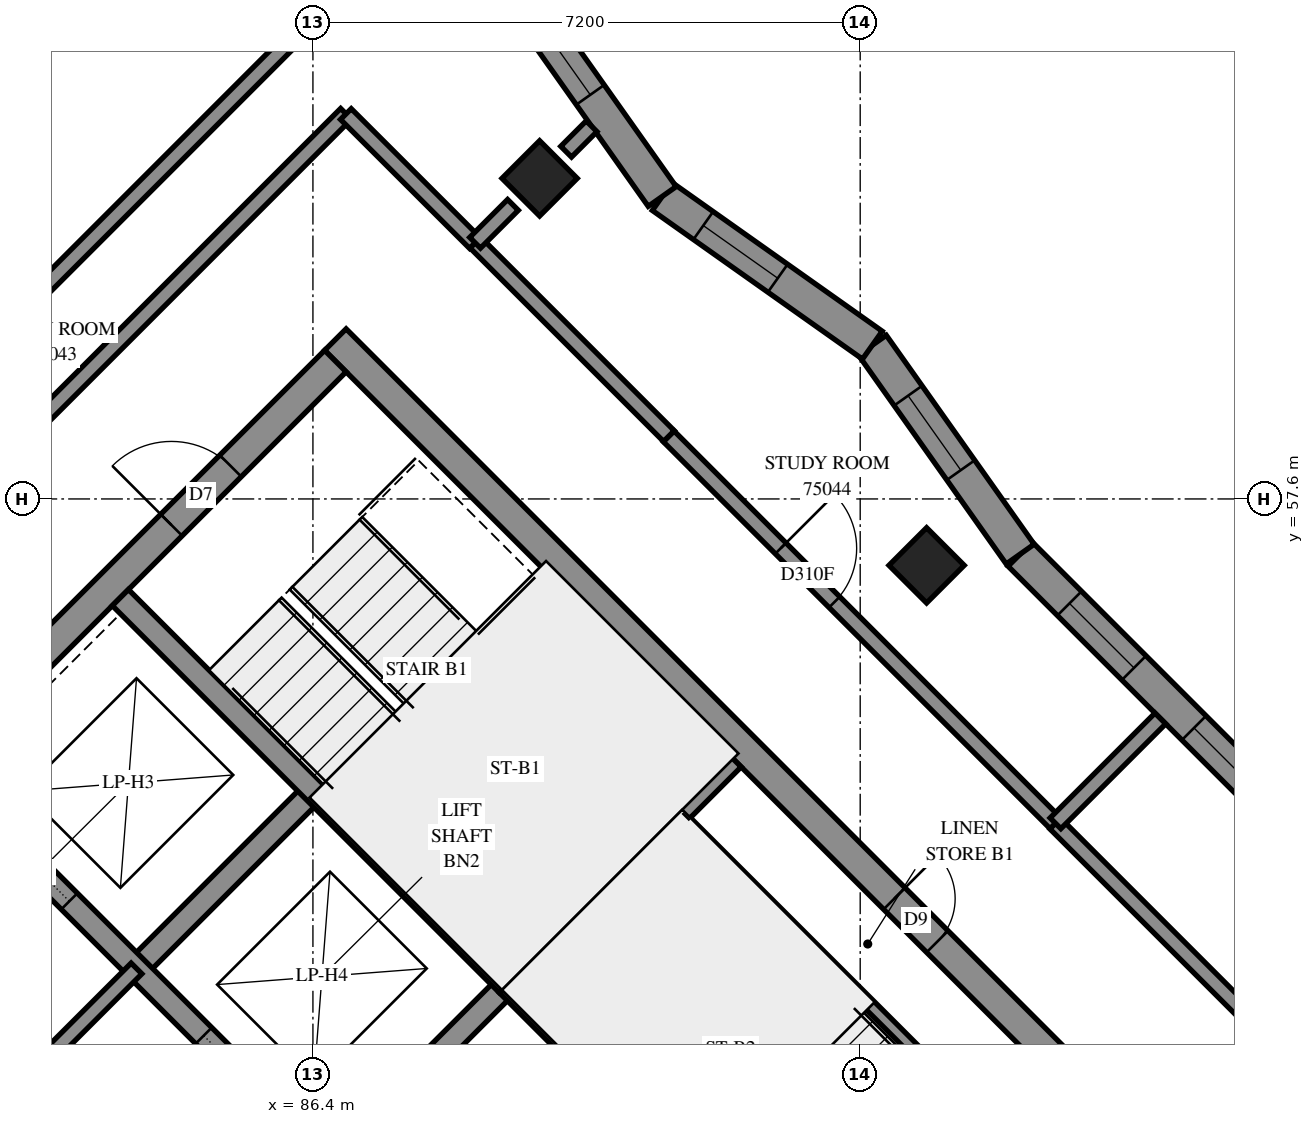
"""IFC4 building model, lengths in metres.
Left out: names, types, materials, properties, quantities, classifications, styles, units other than length and angle.
Written with IfcOpenShell. Run it as: python <this file> out.ifc"""

import sys

from ifc_helpers import new_model, si_unit, direction, frame, frame_2d, origin, origin_2d, place, context, subcontext, project, spatial, polyline, rectangle, outline, extrude, element, fill, save


model = new_model("IFC4")
c1 = context("Model", 3, precision=1e-05, world=origin(), true_north=direction((0.0, 1.0)))
c2 = subcontext(c1, "Body", "Model", "MODEL_VIEW")
j1 = project(units=[si_unit("LENGTHUNIT", "METRE"), si_unit("PLANEANGLEUNIT", "RADIAN")], contexts=[c1])
p1 = place(None, origin())
s1 = spatial("IfcSite", under=j1, at=p1, CompositionType="ELEMENT")
p2 = place(p1, origin())
s2 = spatial("IfcBuilding", under=s1, at=p2, CompositionType="ELEMENT")
p3 = place(p2, frame((0.0, 0.0, 274.4)))
s3 = spatial("IfcBuildingStorey", under=s2, at=p3, CompositionType="ELEMENT", Elevation=274.4)
for number, where, z_axis, x_axis in (
    (1, (89.382, 61.818, 0.0), (0.0, 0.0, 1.0), (0.707, -0.707, 0.0)),
    (2, (94.474, 56.727, 0.0), (0.0, 0.0, 1.0), (0.707, -0.707, 0.0)),
):
    element("IfcColumn", number, at=place(p3, frame(where, z_axis=z_axis, x_axis=x_axis)), inside=s3, PredefinedType="COLUMN", context=c2, shape_type="SweptSolid", body=[
        extrude(rectangle(XDim=0.7, YDim=0.7, at=origin_2d()), origin(), (0.0, 0.0, 1.0), 3.1),
    ])
p4 = place(p3, frame((86.695, 59.696, -0.3), z_axis=(0.0, 0.0, 1.0), x_axis=(0.7071100706, -0.7071034917, 0.0)))
e3 = element("IfcWall", 3, at=p4, inside=s3, PredefinedType="SHEAR", context=c2, shape_type="SweptSolid", body=[
    extrude(rectangle(XDim=15.2, YDim=0.4, at=frame_2d((7.6, 0.0))), origin(), (0.0, 0.0, 1.0), 2.7),
])
p5 = place(p4, frame((10.4, 0.0, 0.3)))
e4 = element("IfcOpeningElement", 4, at=p5, cuts=e3, PredefinedType="OPENING", context=c2, shape_type="SweptSolid", body=[
    extrude(rectangle(XDim=0.8, YDim=2.1, at=frame_2d((0.4, 1.05))), frame((0.0, 0.21, 0.0), z_axis=(0.0, -1.0, 0.0), x_axis=(1.0, 0.0, 0.0)), (0.0, 0.0, 1.0), 0.42),
])
p6 = place(p3, frame((76.513, 49.231, -0.3), z_axis=(0.0, 0.0, 1.0), x_axis=(0.7071067812, 0.7071067812, 0.0)))
e5 = element("IfcWall", 5, at=p6, inside=s3, PredefinedType="SHEAR", context=c2, shape_type="SweptSolid", body=[
    extrude(rectangle(XDim=14.4, YDim=0.4, at=frame_2d((7.2, 0.0))), origin(), (0.0, 0.0, 1.0), 2.7),
])
p7 = place(p6, frame((4.55, 0.0, 0.3)))
e6 = element("IfcOpeningElement", 6, at=p7, cuts=e5, PredefinedType="OPENING", context=c2, shape_type="SweptSolid", body=[
    extrude(rectangle(XDim=1.1, YDim=2.1, at=frame_2d((0.55, 1.05))), frame((0.0, 0.21, 0.0), z_axis=(0.0, -1.0, 0.0), x_axis=(1.0, 0.0, 0.0)), (0.0, 0.0, 1.0), 0.42),
])
p8 = place(p6, frame((11.35, 0.0, 0.3)))
e7 = element("IfcOpeningElement", 7, at=p8, cuts=e5, PredefinedType="OPENING", context=c2, shape_type="SweptSolid", body=[
    extrude(rectangle(XDim=1.1, YDim=2.1, at=frame_2d((0.55, 1.05))), frame((0.0, 0.21, 0.0), z_axis=(0.0, -1.0, 0.0), x_axis=(1.0, 0.0, 0.0)), (0.0, 0.0, 1.0), 0.42),
])
p9 = place(p3, frame((84.079, 51.423, 0.0), z_axis=(0.0, 0.0, 1.0), x_axis=(0.7071219326, 0.7070916295, 0.0)))
e8 = element("IfcWall", 8, at=p9, inside=s3, PredefinedType="SOLIDWALL", context=c2, shape_type="SweptSolid", body=[
    extrude(rectangle(XDim=3.3, YDim=0.3, at=frame_2d((1.65, 0.0))), origin(), (0.0, 0.0, 1.0), 3.1),
])
p10 = place(p3, frame((86.625, 48.878, 0.0), z_axis=(0.0, 0.0, 1.0), x_axis=(0.7071067812, 0.7071067812, 0.0)))
e9 = element("IfcWall", 9, at=p10, inside=s3, PredefinedType="SOLIDWALL", context=c2, shape_type="SweptSolid", body=[
    extrude(rectangle(XDim=3.3, YDim=0.3, at=frame_2d((1.65, 0.0))), origin(), (0.0, 0.0, 1.0), 3.1),
])
p11 = place(p3, frame((78.988, 51.423, 0.0), z_axis=(0.0, 0.0, 1.0), x_axis=(0.7071067812, -0.7071067812, 0.0)))
e10 = element("IfcWall", 10, at=p11, inside=s3, PredefinedType="SOLIDWALL", context=c2, shape_type="SweptSolid", body=[
    extrude(rectangle(XDim=14.4, YDim=0.3, at=frame_2d((7.2, 0.0))), origin(), (0.0, 0.0, 1.0), 3.1),
])
p12 = place(p11, frame((1.35, 0.0, 0.0)))
e11 = element("IfcOpeningElement", 11, at=p12, cuts=e10, PredefinedType="OPENING", context=c2, shape_type="SweptSolid", body=[
    extrude(rectangle(XDim=0.9, YDim=2.1, at=frame_2d((0.45, 1.05))), frame((0.0, 0.16, 0.0), z_axis=(0.0, -1.0, 0.0), x_axis=(1.0, 0.0, 0.0)), (0.0, 0.0, 1.0), 0.32),
])
p13 = place(p11, frame((4.95, 0.0, 0.0)))
e12 = element("IfcOpeningElement", 12, at=p13, cuts=e10, PredefinedType="OPENING", context=c2, shape_type="SweptSolid", body=[
    extrude(rectangle(XDim=0.9, YDim=2.1, at=frame_2d((0.45, 1.05))), frame((0.0, 0.16, 0.0), z_axis=(0.0, -1.0, 0.0), x_axis=(1.0, 0.0, 0.0)), (0.0, 0.0, 1.0), 0.32),
])
p14 = place(p11, frame((8.55, 0.0, 0.0)))
e13 = element("IfcOpeningElement", 13, at=p14, cuts=e10, PredefinedType="OPENING", context=c2, shape_type="SweptSolid", body=[
    extrude(rectangle(XDim=0.9, YDim=2.1, at=frame_2d((0.45, 1.05))), frame((0.0, 0.16, 0.0), z_axis=(0.0, -1.0, 0.0), x_axis=(1.0, 0.0, 0.0)), (0.0, 0.0, 1.0), 0.32),
])
p15 = place(p11, frame((12.05, 0.0, 0.0)))
e14 = element("IfcOpeningElement", 14, at=p15, cuts=e10, PredefinedType="OPENING", context=c2, shape_type="SweptSolid", body=[
    extrude(rectangle(XDim=1.1, YDim=2.1, at=frame_2d((0.55, 1.05))), frame((0.0, 0.16, 0.0), z_axis=(0.0, -1.0, 0.0), x_axis=(1.0, 0.0, 0.0)), (0.0, 0.0, 1.0), 0.32),
])
p16 = place(p3, frame((81.534, 53.969, 0.0), z_axis=(0.0, 0.0, 1.0), x_axis=(0.707103309, -0.7071102534, 0.0)))
e15 = element("IfcWall", 15, at=p16, inside=s3, PredefinedType="SOLIDWALL", context=c2, shape_type="SweptSolid", body=[
    extrude(rectangle(XDim=14.4, YDim=0.3, at=frame_2d((7.2, 0.0))), origin(), (0.0, 0.0, 1.0), 3.1),
])
p17 = place(p16, frame((8.55, 0.0, 0.0)))
e16 = element("IfcOpeningElement", 16, at=p17, cuts=e15, PredefinedType="OPENING", context=c2, shape_type="SweptSolid", body=[
    extrude(rectangle(XDim=0.9, YDim=2.1, at=frame_2d((0.45, 1.05))), frame((0.0, 0.16, 0.0), z_axis=(0.0, -1.0, 0.0), x_axis=(1.0, 0.0, 0.0)), (0.0, 0.0, 1.0), 0.32),
])
p18 = place(p16, frame((1.25, 0.0, 0.0)))
e17 = element("IfcOpeningElement", 17, at=p18, cuts=e15, PredefinedType="OPENING", context=c2, shape_type="SweptSolid", body=[
    extrude(rectangle(XDim=1.1, YDim=2.1, at=frame_2d((0.55, 1.05))), frame((0.0, 0.16, 0.0), z_axis=(0.0, -1.0, 0.0), x_axis=(1.0, 0.0, 0.0)), (0.0, 0.0, 1.0), 0.32),
])
p19 = place(p16, frame((4.85, 0.0, 0.0)))
e18 = element("IfcOpeningElement", 18, at=p19, cuts=e15, PredefinedType="OPENING", context=c2, shape_type="SweptSolid", body=[
    extrude(rectangle(XDim=1.1, YDim=2.1, at=frame_2d((0.55, 1.05))), frame((0.0, 0.16, 0.0), z_axis=(0.0, -1.0, 0.0), x_axis=(1.0, 0.0, 0.0)), (0.0, 0.0, 1.0), 0.32),
])
p20 = place(p16, frame((12.05, 0.0, 0.0)))
e19 = element("IfcOpeningElement", 19, at=p20, cuts=e15, PredefinedType="OPENING", context=c2, shape_type="SweptSolid", body=[
    extrude(rectangle(XDim=1.1, YDim=2.1, at=frame_2d((0.55, 1.05))), frame((0.0, 0.16, 0.0), z_axis=(0.0, -1.0, 0.0), x_axis=(1.0, 0.0, 0.0)), (0.0, 0.0, 1.0), 0.32),
])
for number, where, z_axis, x_axis in (
    (20, (83.867, 56.302, 0.0), (0.0, 0.0, 1.0), (0.707, -0.707, 0.0)),
    (21, (88.958, 51.211, 0.0), (0.0, 0.0, 1.0), (0.707, -0.707, 0.0)),
):
    element("IfcWall", number, at=place(p3, frame(where, z_axis=z_axis, x_axis=x_axis)), inside=s3, PredefinedType="SOLIDWALL", context=c2, shape_type="SweptSolid", body=[
        extrude(rectangle(XDim=7.2, YDim=0.3, at=frame_2d((3.6, 0.0))), origin(), (0.0, 0.0, 1.0), 3.1),
    ])
p21 = place(p3, frame((88.958, 51.211, 0.0), z_axis=(0.0, 0.0, 1.0), x_axis=(0.7071067812, 0.7071067812, 0.0)))
e22 = element("IfcWall", 22, at=p21, inside=s3, PredefinedType="SOLIDWALL", context=c2, shape_type="SweptSolid", body=[
    extrude(rectangle(XDim=4.2, YDim=0.3, at=frame_2d((2.1, 0.0))), origin(), (0.0, 0.0, 1.0), 3.1),
])
p22 = place(p3, frame((100.466, 52.113, 0.0), z_axis=(0.0, 0.0, 1.0), x_axis=(-0.7071067812, 0.7071067812, 0.0)))
e23 = element("IfcWall", 23, at=p22, inside=s3, PredefinedType="SOLIDWALL", context=c2, shape_type="SweptSolid", body=[
    extrude(outline(polyline([(0.038, -0.225), (6.715, -0.225), (6.753, 0.225), (-0.038, 0.225), (0.038, -0.225)])), origin(), (0.0, 0.0, 1.0), 3.1),
])
p23 = place(p22, frame((0.7, 0.0, 0.45)))
e24 = element("IfcOpeningElement", 24, at=p23, cuts=e23, PredefinedType="OPENING", context=c2, shape_type="SweptSolid", body=[
    extrude(rectangle(XDim=2.8, YDim=2.55, at=frame_2d((1.4, 1.275))), frame((0.0, 0.235, 0.0), z_axis=(0.0, -1.0, 0.0), x_axis=(1.0, 0.0, 0.0)), (0.0, 0.0, 1.0), 0.47),
])
p24 = place(p22, frame((4.617, 0.0, 0.45)))
e25 = element("IfcOpeningElement", 25, at=p24, cuts=e23, PredefinedType="OPENING", context=c2, shape_type="SweptSolid", body=[
    extrude(rectangle(XDim=1.2, YDim=2.55, at=frame_2d((0.6, 1.275))), frame((0.0, 0.235, 0.0), z_axis=(0.0, -1.0, 0.0), x_axis=(1.0, 0.0, 0.0)), (0.0, 0.0, 1.0), 0.47),
])
p25 = place(p3, frame((95.705, 56.874, 0.0), z_axis=(0.0, 0.0, 1.0), x_axis=(-0.5775269957, 0.8163715877, 0.0)))
e26 = element("IfcWall", 26, at=p25, inside=s3, PredefinedType="SOLIDWALL", context=c2, shape_type="SweptSolid", body=[
    extrude(outline(polyline([(0.019, -0.225), (3.406, -0.225), (3.329, 0.225), (-0.019, 0.225), (0.019, -0.225)])), origin(), (0.0, 0.0, 1.0), 3.1),
])
p26 = place(p25, frame((1.353, 0.0, 0.45)))
e27 = element("IfcOpeningElement", 27, at=p26, cuts=e26, PredefinedType="OPENING", context=c2, shape_type="SweptSolid", body=[
    extrude(rectangle(XDim=1.2, YDim=2.55, at=frame_2d((0.6, 1.275))), frame((0.0, 0.235, 0.0), z_axis=(0.0, -1.0, 0.0), x_axis=(1.0, 0.0, 0.0)), (0.0, 0.0, 1.0), 0.47),
])
p27 = place(p3, frame((93.76, 59.623, 0.0), z_axis=(0.0, 0.0, 1.0), x_axis=(-0.8163643715, 0.5775371961, 0.0)))
e28 = element("IfcWall", 28, at=p27, inside=s3, PredefinedType="SOLIDWALL", context=c2, shape_type="SweptSolid", body=[
    extrude(outline(polyline([(-0.039, -0.225), (3.348, -0.225), (3.425, 0.225), (0.039, 0.225), (-0.039, -0.225)])), origin(), (0.0, 0.0, 1.0), 3.1),
])
p28 = place(p27, frame((1.525, 0.0, 0.45)))
e29 = element("IfcOpeningElement", 29, at=p28, cuts=e28, PredefinedType="OPENING", context=c2, shape_type="SweptSolid", body=[
    extrude(rectangle(XDim=1.2, YDim=2.55, at=frame_2d((0.6, 1.275))), frame((0.0, 0.235, 0.0), z_axis=(0.0, -1.0, 0.0), x_axis=(1.0, 0.0, 0.0)), (0.0, 0.0, 1.0), 0.47),
])
p29 = place(p3, frame((90.995, 61.579, 0.0), z_axis=(0.0, 0.0, 1.0), x_axis=(-0.5775314394, 0.8163684441, 0.0)))
e30 = element("IfcWall", 30, at=p29, inside=s3, PredefinedType="SOLIDWALL", context=c2, shape_type="SweptSolid", body=[
    extrude(outline(polyline([(0.039, -0.225), (3.425, -0.225), (3.348, 0.225), (-0.039, 0.225), (0.039, -0.225)])), origin(), (0.0, 0.0, 1.0), 3.1),
])
p30 = place(p29, frame((1.638, 0.0, 0.45)))
e31 = element("IfcOpeningElement", 31, at=p30, cuts=e30, PredefinedType="OPENING", context=c2, shape_type="SweptSolid", body=[
    extrude(rectangle(XDim=1.2, YDim=2.55, at=frame_2d((0.6, 1.275))), frame((0.0, 0.235, 0.0), z_axis=(0.0, -1.0, 0.0), x_axis=(1.0, 0.0, 0.0)), (0.0, 0.0, 1.0), 0.47),
])
p31 = place(p3, frame((91.313, 53.354, 0.0), z_axis=(0.0, 0.0, 1.0), x_axis=(0.7071067812, -0.7071067812, 0.0)))
e32 = element("IfcWall", 32, at=p31, inside=s3, PredefinedType="PARTITIONING", context=c2, shape_type="SweptSolid", body=[
    extrude(rectangle(XDim=5.65, YDim=0.15, at=frame_2d((2.825, 0.0))), origin(), (0.0, 0.0, 1.0), 3.1),
])
p32 = place(p3, frame((81.534, 48.878, 0.0), z_axis=(0.0, 0.0, 1.0), x_axis=(0.707092892, 0.7071206701, 0.0)))
e33 = element("IfcWall", 33, at=p32, inside=s3, PredefinedType="PARTITIONING", context=c2, shape_type="SweptSolid", body=[
    extrude(rectangle(XDim=3.6, YDim=0.2, at=frame_2d((1.8, 0.0))), origin(), (0.0, 0.0, 1.0), 3.1),
])
p33 = place(p3, frame((80.803, 58.323, 0.0), z_axis=(0.0, 0.0, 1.0), x_axis=(0.7070024374, 0.7072111096, 0.0)))
e34 = element("IfcWall", 34, at=p33, inside=s3, PredefinedType="PARTITIONING", context=c2, shape_type="SweptSolid", body=[
    extrude(rectangle(XDim=9.584, YDim=0.2, at=frame_2d((4.792, 0.0))), origin(), (0.0, 0.0, 1.0), 3.1),
])
p34 = place(p3, frame((80.802, 56.633, 0.0), z_axis=(0.0, 0.0, 1.0), x_axis=(0.7071067812, 0.7071067812, 0.0)))
e35 = element("IfcWall", 35, at=p34, inside=s3, PredefinedType="PARTITIONING", context=c2, shape_type="SweptSolid", body=[
    extrude(rectangle(XDim=8.533, YDim=0.2, at=frame_2d((4.267, 0.0))), origin(), (0.0, 0.0, 1.0), 3.1),
])
p35 = place(p34, frame((0.817, 0.0, 0.0)))
e36 = element("IfcOpeningElement", 36, at=p35, cuts=e35, PredefinedType="OPENING", context=c2, shape_type="SweptSolid", body=[
    extrude(rectangle(XDim=1.0, YDim=2.1, at=frame_2d((0.5, 1.05))), frame((0.0, 0.11, 0.0), z_axis=(0.0, -1.0, 0.0), x_axis=(1.0, 0.0, 0.0)), (0.0, 0.0, 1.0), 0.22),
])
p36 = place(p3, frame((91.08, 58.424, 0.0), z_axis=(0.0, 0.0, 1.0), x_axis=(0.7069678741, -0.707245661, 0.0)))
e37 = element("IfcWall", 37, at=p36, inside=s3, PredefinedType="PARTITIONING", context=c2, shape_type="SweptSolid", body=[
    extrude(rectangle(XDim=7.2, YDim=0.2, at=frame_2d((3.6, 0.0))), origin(), (0.0, 0.0, 1.0), 3.1),
])
p37 = place(p36, frame((2.084, 0.0, 0.0)))
e38 = element("IfcOpeningElement", 38, at=p37, cuts=e37, PredefinedType="OPENING", context=c2, shape_type="SweptSolid", body=[
    extrude(rectangle(XDim=1.0, YDim=2.1, at=frame_2d((0.5, 1.05))), frame((0.0, 0.11, 0.0), z_axis=(0.0, -1.0, 0.0), x_axis=(1.0, 0.0, 0.0)), (0.0, 0.0, 1.0), 0.22),
])
p38 = place(p3, frame((96.167, 53.329, 0.0), z_axis=(0.0, 0.0, 1.0), x_axis=(0.7071067812, -0.7071067812, 0.0)))
e39 = element("IfcWall", 39, at=p38, inside=s3, PredefinedType="PARTITIONING", context=c2, shape_type="SweptSolid", body=[
    extrude(rectangle(XDim=5.999, YDim=0.2, at=frame_2d((3.0, 0.0))), origin(), (0.0, 0.0, 1.0), 3.1),
])
p39 = place(p3, frame((88.537, 60.973, 0.0), z_axis=(0.0, 0.0, 1.0), x_axis=(0.7071067812, -0.7071067812, 0.0)))
e40 = element("IfcWall", 40, at=p39, inside=s3, PredefinedType="PARTITIONING", context=c2, shape_type="SweptSolid", body=[
    extrude(rectangle(XDim=3.601, YDim=0.2, at=frame_2d((1.8, 0.0))), origin(), (0.0, 0.0, 1.0), 3.1),
])
p40 = place(p3, frame((86.833, 62.663, 0.0), z_axis=(0.0, 0.0, 1.0), x_axis=(0.7075233388, -0.706689978, 0.0)))
e41 = element("IfcWall", 41, at=p40, inside=s3, PredefinedType="PARTITIONING", context=c2, shape_type="SweptSolid", body=[
    extrude(rectangle(XDim=2.4, YDim=0.2, at=frame_2d((1.2, 0.0))), origin(), (0.0, 0.0, 1.0), 3.1),
])
p41 = place(p3, frame((96.169, 53.333, 0.0), z_axis=(0.0, 0.0, 1.0), x_axis=(0.7070811488, 0.7071324126, 0.0)))
e42 = element("IfcWall", 42, at=p41, inside=s3, PredefinedType="PARTITIONING", context=c2, shape_type="SweptSolid", body=[
    extrude(rectangle(XDim=1.951, YDim=0.2, at=frame_2d((0.975, 0.0))), origin(), (0.0, 0.0, 1.0), 3.1),
])
p42 = place(p3, frame((88.534, 60.971, 0.0), z_axis=(0.0, 0.0, 1.0), x_axis=(0.7071067812, 0.7071067812, 0.0)))
e43 = element("IfcWall", 43, at=p42, inside=s3, PredefinedType="PARTITIONING", context=c2, shape_type="SweptSolid", body=[
    extrude(rectangle(XDim=0.704, YDim=0.2, at=frame_2d((0.352, 0.0))), origin(), (0.0, 0.0, 1.0), 3.1),
])
p43 = place(p3, frame((89.731, 62.169, 0.0), z_axis=(0.0, 0.0, 1.0), x_axis=(0.7071067812, 0.7071067812, 0.0)))
e44 = element("IfcWall", 44, at=p43, inside=s3, PredefinedType="PARTITIONING", context=c2, shape_type="SweptSolid", body=[
    extrude(rectangle(XDim=0.473, YDim=0.2, at=frame_2d((0.236, 0.0))), origin(), (0.0, 0.0, 1.0), 3.1),
])
p44 = place(p23, origin())
e45 = element("IfcWindow", 45, at=p44, inside=s3, PartitioningType="SINGLE_PANEL", PredefinedType="WINDOW", context=c2, shape_type="SweptSolid", body=[
    extrude(rectangle(XDim=2.8, YDim=2.55, at=frame_2d((1.4, 1.275))), frame((0.0, 0.205, 0.0), z_axis=(0.0, -1.0, 0.0), x_axis=(1.0, 0.0, 0.0)), (0.0, 0.0, 1.0), 0.06),
])
fill(e24, e45)
p45 = place(p24, origin())
e46 = element("IfcWindow", 46, at=p45, inside=s3, PartitioningType="SINGLE_PANEL", PredefinedType="WINDOW", context=c2, shape_type="SweptSolid", body=[
    extrude(rectangle(XDim=1.2, YDim=2.55, at=frame_2d((0.6, 1.275))), frame((0.0, 0.205, 0.0), z_axis=(0.0, -1.0, 0.0), x_axis=(1.0, 0.0, 0.0)), (0.0, 0.0, 1.0), 0.06),
])
fill(e25, e46)
p46 = place(p26, origin())
e47 = element("IfcWindow", 47, at=p46, inside=s3, PartitioningType="SINGLE_PANEL", PredefinedType="WINDOW", context=c2, shape_type="SweptSolid", body=[
    extrude(rectangle(XDim=1.2, YDim=2.55, at=frame_2d((0.6, 1.275))), frame((0.0, 0.205, 0.0), z_axis=(0.0, -1.0, 0.0), x_axis=(1.0, 0.0, 0.0)), (0.0, 0.0, 1.0), 0.06),
])
fill(e27, e47)
p47 = place(p28, origin())
e48 = element("IfcWindow", 48, at=p47, inside=s3, PartitioningType="SINGLE_PANEL", PredefinedType="WINDOW", context=c2, shape_type="SweptSolid", body=[
    extrude(rectangle(XDim=1.2, YDim=2.55, at=frame_2d((0.6, 1.275))), frame((0.0, 0.205, 0.0), z_axis=(0.0, -1.0, 0.0), x_axis=(1.0, 0.0, 0.0)), (0.0, 0.0, 1.0), 0.06),
])
fill(e29, e48)
p48 = place(p30, origin())
e49 = element("IfcWindow", 49, at=p48, inside=s3, PartitioningType="SINGLE_PANEL", PredefinedType="WINDOW", context=c2, shape_type="SweptSolid", body=[
    extrude(rectangle(XDim=1.2, YDim=2.55, at=frame_2d((0.6, 1.275))), frame((0.0, 0.205, 0.0), z_axis=(0.0, -1.0, 0.0), x_axis=(1.0, 0.0, 0.0)), (0.0, 0.0, 1.0), 0.06),
])
fill(e31, e49)
p49 = place(p5, origin())
e50 = element("IfcDoor", 50, at=p49, inside=s3, OperationType="SINGLE_SWING_RIGHT", PredefinedType="DOOR", context=c2, shape_type="SweptSolid", body=[
    extrude(rectangle(XDim=0.8, YDim=2.1, at=frame_2d((0.4, 1.05))), frame((0.0, 0.025, 0.0), z_axis=(0.0, -1.0, 0.0), x_axis=(1.0, 0.0, 0.0)), (0.0, 0.0, 1.0), 0.05),
])
fill(e4, e50)
p50 = place(p8, origin())
e51 = element("IfcDoor", 51, at=p50, inside=s3, OperationType="SINGLE_SWING_LEFT", PredefinedType="DOOR", context=c2, shape_type="SweptSolid", body=[
    extrude(rectangle(XDim=1.1, YDim=2.1, at=frame_2d((0.55, 1.05))), frame((0.0, 0.025, 0.0), z_axis=(0.0, -1.0, 0.0), x_axis=(1.0, 0.0, 0.0)), (0.0, 0.0, 1.0), 0.05),
])
fill(e7, e51)
p51 = place(p18, origin())
e52 = element("IfcDoor", 52, at=p51, inside=s3, OperationType="SLIDING_TO_LEFT", PredefinedType="DOOR", context=c2, shape_type="SweptSolid", body=[
    extrude(rectangle(XDim=1.1, YDim=2.1, at=frame_2d((0.55, 1.05))), frame((0.0, 0.025, 0.0), z_axis=(0.0, -1.0, 0.0), x_axis=(1.0, 0.0, 0.0)), (0.0, 0.0, 1.0), 0.05),
])
fill(e17, e52)
p52 = place(p19, origin())
e53 = element("IfcDoor", 53, at=p52, inside=s3, OperationType="SLIDING_TO_RIGHT", PredefinedType="DOOR", context=c2, shape_type="SweptSolid", body=[
    extrude(rectangle(XDim=1.1, YDim=2.1, at=frame_2d((0.55, 1.05))), frame((0.0, 0.025, 0.0), z_axis=(0.0, -1.0, 0.0), x_axis=(1.0, 0.0, 0.0)), (0.0, 0.0, 1.0), 0.05),
])
fill(e18, e53)
p53 = place(p37, origin())
e54 = element("IfcDoor", 54, at=p53, inside=s3, OperationType="SINGLE_SWING_LEFT", PredefinedType="DOOR", context=c2, shape_type="SweptSolid", body=[
    extrude(rectangle(XDim=1.0, YDim=2.1, at=frame_2d((0.5, 1.05))), frame((0.0, 0.025, 0.0), z_axis=(0.0, -1.0, 0.0), x_axis=(1.0, 0.0, 0.0)), (0.0, 0.0, 1.0), 0.05),
])
fill(e38, e54)
save(model, sys.argv[1])
